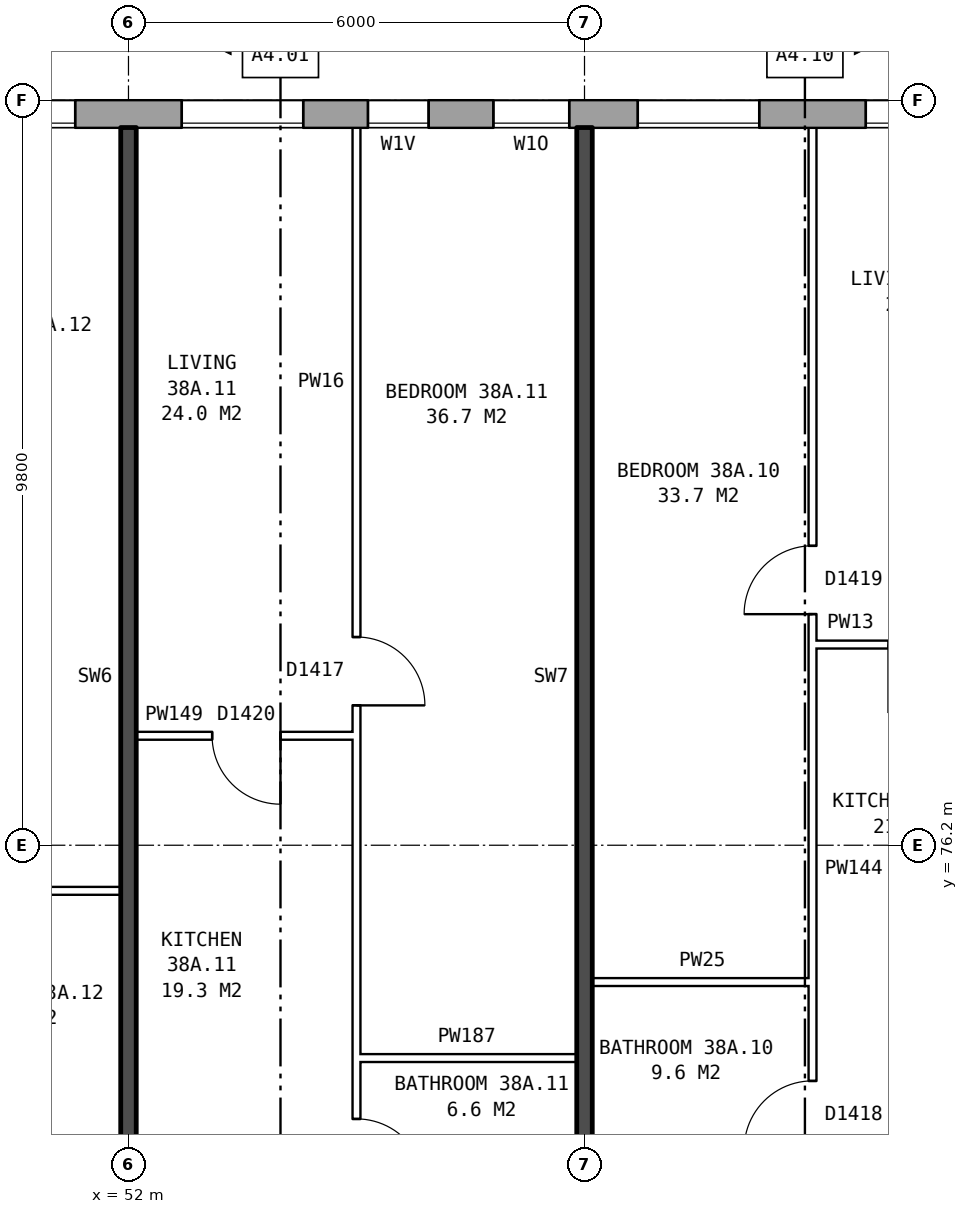
"""IFC4 building model, lengths in metres.
Left out: names, types, materials, properties, quantities, classifications, styles, units other than length and angle.
Written with IfcOpenShell. Run it as: python <this file> out.ifc"""

import sys

from ifc_helpers import new_model, si_unit, direction, frame, frame_2d, origin, place, context, subcontext, project, spatial, rectangle, extrude, element, fill, save


model = new_model("IFC4")
c1 = context("Model", 3, precision=1e-05, world=origin(), true_north=direction((0.0, 1.0)))
c2 = subcontext(c1, "Body", "Model", "MODEL_VIEW")
j1 = project(units=[si_unit("LENGTHUNIT", "METRE"), si_unit("PLANEANGLEUNIT", "RADIAN")], contexts=[c1])
p1 = place(None, origin())
s1 = spatial("IfcSite", under=j1, at=p1, CompositionType="ELEMENT")
p2 = place(p1, origin())
s2 = spatial("IfcBuilding", under=s1, at=p2, CompositionType="ELEMENT")
p3 = place(p2, frame((0.0, 0.0, 136.1)))
s3 = spatial("IfcBuildingStorey", under=s2, at=p3, CompositionType="ELEMENT", Elevation=136.1)
p4 = place(p3, frame((72.925, 85.82, 0.0), z_axis=(0.0, 0.0, 1.0), x_axis=(-1.0, 0.0, 0.0)))
e1 = element("IfcWall", 1, at=p4, inside=s3, PredefinedType="STANDARD", context=c2, shape_type="SweptSolid", body=[
    extrude(rectangle(XDim=43.101, YDim=0.36, at=frame_2d((21.55, 0.0))), origin(), (0.0, 0.0, 1.0), 2.85),
])
p5 = place(p4, frame((0.625, 0.0, 0.8)))
e2 = element("IfcOpeningElement", 2, at=p5, cuts=e1, PredefinedType="OPENING", context=c2, shape_type="SweptSolid", body=[
    extrude(rectangle(XDim=1.6, YDim=1.8, at=frame_2d((0.8, 0.9))), frame((0.0, 0.19, 0.0), z_axis=(0.0, -1.0, 0.0), x_axis=(1.0, 0.0, 0.0)), (0.0, 0.0, 1.0), 0.38),
])
p6 = place(p4, frame((3.625, 0.0, 0.8)))
e3 = element("IfcOpeningElement", 3, at=p6, cuts=e1, PredefinedType="OPENING", context=c2, shape_type="SweptSolid", body=[
    extrude(rectangle(XDim=1.6, YDim=1.8, at=frame_2d((0.8, 0.9))), frame((0.0, 0.19, 0.0), z_axis=(0.0, -1.0, 0.0), x_axis=(1.0, 0.0, 0.0)), (0.0, 0.0, 1.0), 0.38),
])
p7 = place(p4, frame((6.625, 0.0, 0.8)))
e4 = element("IfcOpeningElement", 4, at=p7, cuts=e1, PredefinedType="OPENING", context=c2, shape_type="SweptSolid", body=[
    extrude(rectangle(XDim=1.6, YDim=1.8, at=frame_2d((0.8, 0.9))), frame((0.0, 0.19, 0.0), z_axis=(0.0, -1.0, 0.0), x_axis=(1.0, 0.0, 0.0)), (0.0, 0.0, 1.0), 0.38),
])
p8 = place(p4, frame((9.625, 0.0, 0.8)))
e5 = element("IfcOpeningElement", 5, at=p8, cuts=e1, PredefinedType="OPENING", context=c2, shape_type="SweptSolid", body=[
    extrude(rectangle(XDim=1.6, YDim=1.8, at=frame_2d((0.8, 0.9))), frame((0.0, 0.19, 0.0), z_axis=(0.0, -1.0, 0.0), x_axis=(1.0, 0.0, 0.0)), (0.0, 0.0, 1.0), 0.38),
])
p9 = place(p4, frame((12.625, 0.0, 0.8)))
e6 = element("IfcOpeningElement", 6, at=p9, cuts=e1, PredefinedType="OPENING", context=c2, shape_type="SweptSolid", body=[
    extrude(rectangle(XDim=1.6, YDim=1.8, at=frame_2d((0.8, 0.9))), frame((0.0, 0.19, 0.0), z_axis=(0.0, -1.0, 0.0), x_axis=(1.0, 0.0, 0.0)), (0.0, 0.0, 1.0), 0.38),
])
p10 = place(p4, frame((15.125, 0.0, 1.35)))
e7 = element("IfcOpeningElement", 7, at=p10, cuts=e1, PredefinedType="OPENING", context=c2, shape_type="SweptSolid", body=[
    extrude(rectangle(XDim=1.0, YDim=1.2, at=frame_2d((0.5, 0.6))), frame((0.0, 0.19, 0.0), z_axis=(0.0, -1.0, 0.0), x_axis=(1.0, 0.0, 0.0)), (0.0, 0.0, 1.0), 0.38),
])
p11 = place(p4, frame((18.625, 0.0, 0.8)))
e8 = element("IfcOpeningElement", 8, at=p11, cuts=e1, PredefinedType="OPENING", context=c2, shape_type="SweptSolid", body=[
    extrude(rectangle(XDim=1.6, YDim=1.8, at=frame_2d((0.8, 0.9))), frame((0.0, 0.19, 0.0), z_axis=(0.0, -1.0, 0.0), x_axis=(1.0, 0.0, 0.0)), (0.0, 0.0, 1.0), 0.38),
])
p12 = place(p4, frame((21.625, 0.0, 0.8)))
e9 = element("IfcOpeningElement", 9, at=p12, cuts=e1, PredefinedType="OPENING", context=c2, shape_type="SweptSolid", body=[
    extrude(rectangle(XDim=1.6, YDim=1.8, at=frame_2d((0.8, 0.9))), frame((0.0, 0.19, 0.0), z_axis=(0.0, -1.0, 0.0), x_axis=(1.0, 0.0, 0.0)), (0.0, 0.0, 1.0), 0.38),
])
p13 = place(p4, frame((24.075, 0.0, 0.35)))
e10 = element("IfcOpeningElement", 10, at=p13, cuts=e1, PredefinedType="OPENING", context=c2, shape_type="SweptSolid", body=[
    extrude(rectangle(XDim=0.8, YDim=1.8, at=frame_2d((0.4, 0.9))), frame((0.0, 0.19, 0.0), z_axis=(0.0, -1.0, 0.0), x_axis=(1.0, 0.0, 0.0)), (0.0, 0.0, 1.0), 0.38),
])
p14 = place(p4, frame((27.625, 0.0, 0.8)))
e11 = element("IfcOpeningElement", 11, at=p14, cuts=e1, PredefinedType="OPENING", context=c2, shape_type="SweptSolid", body=[
    extrude(rectangle(XDim=1.6, YDim=1.8, at=frame_2d((0.8, 0.9))), frame((0.0, 0.19, 0.0), z_axis=(0.0, -1.0, 0.0), x_axis=(1.0, 0.0, 0.0)), (0.0, 0.0, 1.0), 0.38),
])
p15 = place(p4, frame((30.625, 0.0, 0.8)))
e12 = element("IfcOpeningElement", 12, at=p15, cuts=e1, PredefinedType="OPENING", context=c2, shape_type="SweptSolid", body=[
    extrude(rectangle(XDim=1.6, YDim=1.8, at=frame_2d((0.8, 0.9))), frame((0.0, 0.19, 0.0), z_axis=(0.0, -1.0, 0.0), x_axis=(1.0, 0.0, 0.0)), (0.0, 0.0, 1.0), 0.38),
])
p16 = place(p4, frame((33.625, 0.0, 0.8)))
e13 = element("IfcOpeningElement", 13, at=p16, cuts=e1, PredefinedType="OPENING", context=c2, shape_type="SweptSolid", body=[
    extrude(rectangle(XDim=1.6, YDim=1.8, at=frame_2d((0.8, 0.9))), frame((0.0, 0.19, 0.0), z_axis=(0.0, -1.0, 0.0), x_axis=(1.0, 0.0, 0.0)), (0.0, 0.0, 1.0), 0.38),
])
p17 = place(p4, frame((36.625, 0.0, 0.8)))
e14 = element("IfcOpeningElement", 14, at=p17, cuts=e1, PredefinedType="OPENING", context=c2, shape_type="SweptSolid", body=[
    extrude(rectangle(XDim=1.6, YDim=1.8, at=frame_2d((0.8, 0.9))), frame((0.0, 0.19, 0.0), z_axis=(0.0, -1.0, 0.0), x_axis=(1.0, 0.0, 0.0)), (0.0, 0.0, 1.0), 0.38),
])
p18 = place(p4, frame((39.625, 0.0, 0.8)))
e15 = element("IfcOpeningElement", 15, at=p18, cuts=e1, PredefinedType="OPENING", context=c2, shape_type="SweptSolid", body=[
    extrude(rectangle(XDim=1.6, YDim=1.8, at=frame_2d((0.8, 0.9))), frame((0.0, 0.19, 0.0), z_axis=(0.0, -1.0, 0.0), x_axis=(1.0, 0.0, 0.0)), (0.0, 0.0, 1.0), 0.38),
])
p19 = place(p4, frame((16.975, 0.0, 0.15)))
e16 = element("IfcOpeningElement", 16, at=p19, cuts=e1, PredefinedType="OPENING", context=c2, shape_type="SweptSolid", body=[
    extrude(rectangle(XDim=0.8, YDim=0.9, at=frame_2d((0.4, 0.45))), frame((0.0, 0.19, 0.0), z_axis=(0.0, -1.0, 0.0), x_axis=(1.0, 0.0, 0.0)), (0.0, 0.0, 1.0), 0.38),
])
p20 = place(p4, frame((25.175, 0.0, 0.25)))
e17 = element("IfcOpeningElement", 17, at=p20, cuts=e1, PredefinedType="OPENING", context=c2, shape_type="SweptSolid", body=[
    extrude(rectangle(XDim=0.8, YDim=0.9, at=frame_2d((0.4, 0.45))), frame((0.0, 0.19, 0.0), z_axis=(0.0, -1.0, 0.0), x_axis=(1.0, 0.0, 0.0)), (0.0, 0.0, 1.0), 0.38),
])
for number, where, z_axis, x_axis in (
    (18, (55.0, 73.4, 0.0), (0.0, 0.0, 1.0), (1.0, 0.0, 0.0)),
    (19, (58.1, 74.4, 0.0), (0.0, 0.0, 1.0), (1.0, 0.0, 0.0)),
    (20, (49.0, 75.6, 0.0), (0.0, 0.0, 1.0), (1.0, 0.0, 0.0)),
):
    element("IfcWall", number, at=place(p3, frame(where, z_axis=z_axis, x_axis=x_axis)), inside=s3, PredefinedType="PARTITIONING", context=c2, shape_type="SweptSolid", body=[
        extrude(rectangle(XDim=2.9, YDim=0.1, at=frame_2d((1.45, 0.0))), origin(), (0.0, 0.0, 1.0), 2.85),
    ])
p21 = place(p3, frame((52.1, 77.64, 0.0), z_axis=(0.0, 0.0, 1.0), x_axis=(1.0, 0.0, 0.0)))
e21 = element("IfcWall", 21, at=p21, inside=s3, PredefinedType="PARTITIONING", context=c2, shape_type="SweptSolid", body=[
    extrude(rectangle(XDim=2.9, YDim=0.1, at=frame_2d((1.45, 0.0))), origin(), (0.0, 0.0, 1.0), 2.85),
])
p22 = place(p21, frame((1.0, 0.0, 0.0)))
e22 = element("IfcOpeningElement", 22, at=p22, cuts=e21, PredefinedType="OPENING", context=c2, shape_type="SweptSolid", body=[
    extrude(rectangle(XDim=0.9, YDim=2.1, at=frame_2d((0.45, 1.05))), frame((0.0, 0.06, 0.0), z_axis=(0.0, -1.0, 0.0), x_axis=(1.0, 0.0, 0.0)), (0.0, 0.0, 1.0), 0.12),
])
p23 = place(p3, frame((61.0, 78.84, 0.0), z_axis=(0.0, 0.0, 1.0), x_axis=(1.0, 0.0, 0.0)))
e23 = element("IfcWall", 23, at=p23, inside=s3, PredefinedType="PARTITIONING", context=c2, shape_type="SweptSolid", body=[
    extrude(rectangle(XDim=2.9, YDim=0.1, at=frame_2d((1.45, 0.0))), origin(), (0.0, 0.0, 1.0), 2.85),
])
p24 = place(p23, frame((1.0, 0.0, 0.0)))
e24 = element("IfcOpeningElement", 24, at=p24, cuts=e23, PredefinedType="OPENING", context=c2, shape_type="SweptSolid", body=[
    extrude(rectangle(XDim=0.9, YDim=2.1, at=frame_2d((0.45, 1.05))), frame((0.0, 0.06, 0.0), z_axis=(0.0, -1.0, 0.0), x_axis=(1.0, 0.0, 0.0)), (0.0, 0.0, 1.0), 0.12),
])
p25 = place(p3, frame((52.0, 71.2, 0.0), z_axis=(0.0, 0.0, 1.0), x_axis=(0.0, 1.0, 0.0)))
e25 = element("IfcWall", 25, at=p25, inside=s3, PredefinedType="SOLIDWALL", context=c2, shape_type="SweptSolid", body=[
    extrude(rectangle(XDim=14.44, YDim=0.2, at=frame_2d((7.22, 0.0))), origin(), (0.0, 0.0, 1.0), 2.85),
])
p26 = place(p3, frame((55.0, 71.3, 0.0), z_axis=(0.0, 0.0, 1.0), x_axis=(0.0, 1.0, 0.0)))
e26 = element("IfcWall", 26, at=p26, inside=s3, PredefinedType="PARTITIONING", context=c2, shape_type="SweptSolid", body=[
    extrude(rectangle(XDim=14.34, YDim=0.1, at=frame_2d((7.17, 0.0))), origin(), (0.0, 0.0, 1.0), 2.85),
])
p27 = place(p26, frame((6.74, 0.0, 0.0)))
e27 = element("IfcOpeningElement", 27, at=p27, cuts=e26, PredefinedType="OPENING", context=c2, shape_type="SweptSolid", body=[
    extrude(rectangle(XDim=0.9, YDim=2.1, at=frame_2d((0.45, 1.05))), frame((0.0, 0.06, 0.0), z_axis=(0.0, -1.0, 0.0), x_axis=(1.0, 0.0, 0.0)), (0.0, 0.0, 1.0), 0.12),
])
p28 = place(p26, frame((0.4, 0.0, 0.0)))
e28 = element("IfcOpeningElement", 28, at=p28, cuts=e26, PredefinedType="OPENING", context=c2, shape_type="SweptSolid", body=[
    extrude(rectangle(XDim=0.9, YDim=2.1, at=frame_2d((0.45, 1.05))), frame((0.0, 0.06, 0.0), z_axis=(0.0, -1.0, 0.0), x_axis=(1.0, 0.0, 0.0)), (0.0, 0.0, 1.0), 0.12),
])
p29 = place(p3, frame((58.0, 71.2, 0.0), z_axis=(0.0, 0.0, 1.0), x_axis=(0.0, 1.0, 0.0)))
e29 = element("IfcWall", 29, at=p29, inside=s3, PredefinedType="SOLIDWALL", context=c2, shape_type="SweptSolid", body=[
    extrude(rectangle(XDim=14.44, YDim=0.2, at=frame_2d((7.22, 0.0))), origin(), (0.0, 0.0, 1.0), 2.85),
])
p30 = place(p3, frame((61.0, 71.3, 0.0), z_axis=(0.0, 0.0, 1.0), x_axis=(0.0, 1.0, 0.0)))
e30 = element("IfcWall", 30, at=p30, inside=s3, PredefinedType="PARTITIONING", context=c2, shape_type="SweptSolid", body=[
    extrude(rectangle(XDim=14.34, YDim=0.1, at=frame_2d((7.17, 0.0))), origin(), (0.0, 0.0, 1.0), 2.85),
])
p31 = place(p30, frame((7.94, 0.0, 0.0)))
e31 = element("IfcOpeningElement", 31, at=p31, cuts=e30, PredefinedType="OPENING", context=c2, shape_type="SweptSolid", body=[
    extrude(rectangle(XDim=0.9, YDim=2.1, at=frame_2d((0.45, 1.05))), frame((0.0, 0.06, 0.0), z_axis=(0.0, -1.0, 0.0), x_axis=(1.0, 0.0, 0.0)), (0.0, 0.0, 1.0), 0.12),
])
p32 = place(p30, frame((0.9, 0.0, 0.0)))
e32 = element("IfcOpeningElement", 32, at=p32, cuts=e30, PredefinedType="OPENING", context=c2, shape_type="SweptSolid", body=[
    extrude(rectangle(XDim=0.9, YDim=2.1, at=frame_2d((0.45, 1.05))), frame((0.0, 0.06, 0.0), z_axis=(0.0, -1.0, 0.0), x_axis=(1.0, 0.0, 0.0)), (0.0, 0.0, 1.0), 0.12),
])
p33 = place(p8, origin())
e33 = element("IfcWindow", 33, at=p33, inside=s3, PartitioningType="SINGLE_PANEL", PredefinedType="WINDOW", context=c2, shape_type="SweptSolid", body=[
    extrude(rectangle(XDim=1.6, YDim=1.8, at=frame_2d((0.8, 0.9))), frame((0.0, 0.15, 0.0), z_axis=(0.0, -1.0, 0.0), x_axis=(1.0, 0.0, 0.0)), (0.0, 0.0, 1.0), 0.06),
])
fill(e5, e33)
p34 = place(p9, origin())
e34 = element("IfcWindow", 34, at=p34, inside=s3, PartitioningType="SINGLE_PANEL", PredefinedType="WINDOW", context=c2, shape_type="SweptSolid", body=[
    extrude(rectangle(XDim=1.6, YDim=1.8, at=frame_2d((0.8, 0.9))), frame((0.0, 0.15, 0.0), z_axis=(0.0, -1.0, 0.0), x_axis=(1.0, 0.0, 0.0)), (0.0, 0.0, 1.0), 0.06),
])
fill(e6, e34)
p35 = place(p10, origin())
e35 = element("IfcWindow", 35, at=p35, inside=s3, PartitioningType="SINGLE_PANEL", PredefinedType="WINDOW", context=c2, shape_type="SweptSolid", body=[
    extrude(rectangle(XDim=1.0, YDim=1.2, at=frame_2d((0.5, 0.6))), frame((0.0, 0.15, 0.0), z_axis=(0.0, -1.0, 0.0), x_axis=(1.0, 0.0, 0.0)), (0.0, 0.0, 1.0), 0.06),
])
fill(e7, e35)
p36 = place(p11, origin())
e36 = element("IfcWindow", 36, at=p36, inside=s3, PartitioningType="SINGLE_PANEL", PredefinedType="WINDOW", context=c2, shape_type="SweptSolid", body=[
    extrude(rectangle(XDim=1.6, YDim=1.8, at=frame_2d((0.8, 0.9))), frame((0.0, 0.15, 0.0), z_axis=(0.0, -1.0, 0.0), x_axis=(1.0, 0.0, 0.0)), (0.0, 0.0, 1.0), 0.06),
])
fill(e8, e36)
p37 = place(p12, origin())
e37 = element("IfcWindow", 37, at=p37, inside=s3, PartitioningType="SINGLE_PANEL", PredefinedType="WINDOW", context=c2, shape_type="SweptSolid", body=[
    extrude(rectangle(XDim=1.6, YDim=1.8, at=frame_2d((0.8, 0.9))), frame((0.0, 0.15, 0.0), z_axis=(0.0, -1.0, 0.0), x_axis=(1.0, 0.0, 0.0)), (0.0, 0.0, 1.0), 0.06),
])
fill(e9, e37)
p38 = place(p31, origin())
e38 = element("IfcDoor", 38, at=p38, inside=s3, OperationType="SINGLE_SWING_LEFT", PredefinedType="DOOR", context=c2, shape_type="SweptSolid", body=[
    extrude(rectangle(XDim=0.9, YDim=2.1, at=frame_2d((0.45, 1.05))), frame((0.0, 0.025, 0.0), z_axis=(0.0, -1.0, 0.0), x_axis=(1.0, 0.0, 0.0)), (0.0, 0.0, 1.0), 0.05),
])
fill(e31, e38)
p39 = place(p32, origin())
e39 = element("IfcDoor", 39, at=p39, inside=s3, OperationType="SINGLE_SWING_LEFT", PredefinedType="DOOR", context=c2, shape_type="SweptSolid", body=[
    extrude(rectangle(XDim=0.9, YDim=2.1, at=frame_2d((0.45, 1.05))), frame((0.0, 0.025, 0.0), z_axis=(0.0, -1.0, 0.0), x_axis=(1.0, 0.0, 0.0)), (0.0, 0.0, 1.0), 0.05),
])
fill(e32, e39)
p40 = place(p27, frame((0.9, 0.0, 0.0), z_axis=(0.0, 0.0, 1.0), x_axis=(-1.0, 0.0, 0.0)))
e40 = element("IfcDoor", 40, at=p40, inside=s3, OperationType="SINGLE_SWING_RIGHT", PredefinedType="DOOR", context=c2, shape_type="SweptSolid", body=[
    extrude(rectangle(XDim=0.9, YDim=2.1, at=frame_2d((0.45, 1.05))), frame((0.0, 0.025, 0.0), z_axis=(0.0, -1.0, 0.0), x_axis=(1.0, 0.0, 0.0)), (0.0, 0.0, 1.0), 0.05),
])
fill(e27, e40)
p41 = place(p22, frame((0.9, 0.0, 0.0), z_axis=(0.0, 0.0, 1.0), x_axis=(-1.0, 0.0, 0.0)))
e41 = element("IfcDoor", 41, at=p41, inside=s3, OperationType="SINGLE_SWING_LEFT", PredefinedType="DOOR", context=c2, shape_type="SweptSolid", body=[
    extrude(rectangle(XDim=0.9, YDim=2.1, at=frame_2d((0.45, 1.05))), frame((0.0, 0.025, 0.0), z_axis=(0.0, -1.0, 0.0), x_axis=(1.0, 0.0, 0.0)), (0.0, 0.0, 1.0), 0.05),
])
fill(e22, e41)
p42 = place(p28, frame((0.9, 0.0, 0.0), z_axis=(0.0, 0.0, 1.0), x_axis=(-1.0, 0.0, 0.0)))
e42 = element("IfcDoor", 42, at=p42, inside=s3, OperationType="SINGLE_SWING_RIGHT", PredefinedType="DOOR", context=c2, shape_type="SweptSolid", body=[
    extrude(rectangle(XDim=0.9, YDim=2.1, at=frame_2d((0.45, 1.05))), frame((0.0, 0.025, 0.0), z_axis=(0.0, -1.0, 0.0), x_axis=(1.0, 0.0, 0.0)), (0.0, 0.0, 1.0), 0.05),
])
fill(e28, e42)
p43 = place(p19, origin())
e43 = element("IfcWindow", 43, at=p43, inside=s3, PartitioningType="SINGLE_PANEL", PredefinedType="WINDOW", context=c2, shape_type="SweptSolid", body=[
    extrude(rectangle(XDim=0.8, YDim=0.9, at=frame_2d((0.4, 0.45))), frame((0.0, 0.15, 0.0), z_axis=(0.0, -1.0, 0.0), x_axis=(1.0, 0.0, 0.0)), (0.0, 0.0, 1.0), 0.06),
])
fill(e16, e43)
save(model, sys.argv[1])
